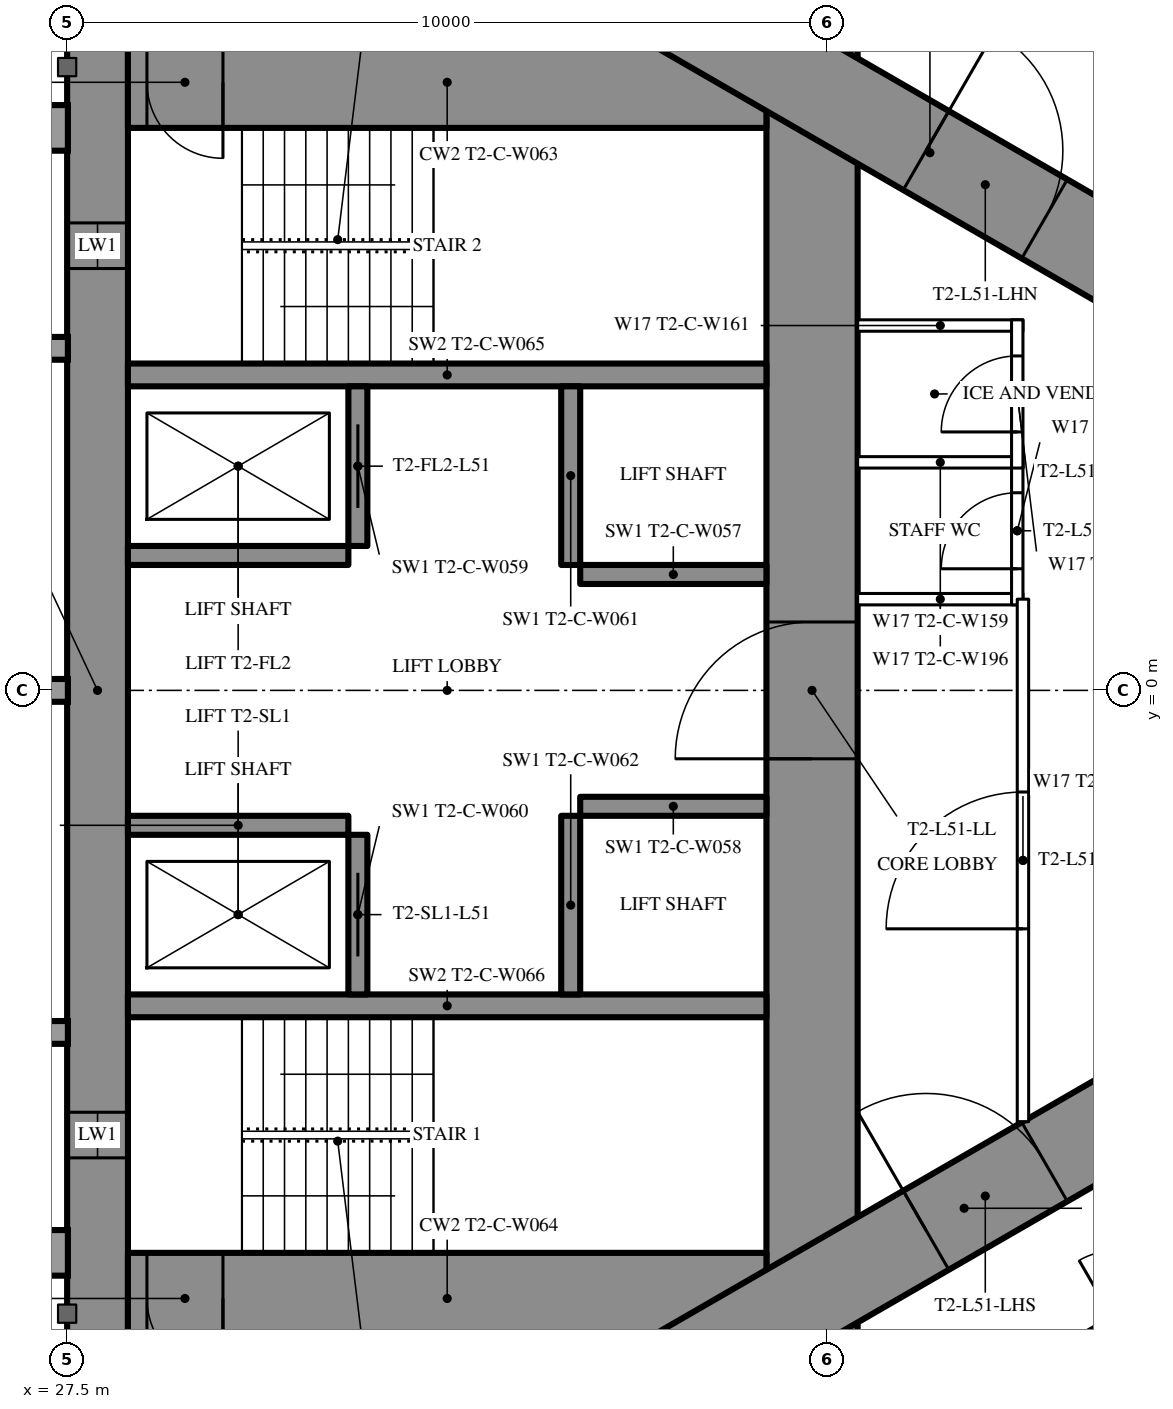
"""IFC4 building model, lengths in metres.
Left out: names, types, materials, properties, quantities, classifications, styles, units other than length and angle.
Written with IfcOpenShell. Run it as: python <this file> out.ifc"""

import sys

from ifc_helpers import new_model, si_unit, direction, frame, frame_2d, origin, place, context, subcontext, project, spatial, rectangle, extrude, element, fill, save


model = new_model("IFC4")
c1 = context("Model", 3, precision=1e-05, world=origin(), true_north=direction((0.0, 1.0)))
c2 = subcontext(c1, "Body", "Model", "MODEL_VIEW")
j1 = project(units=[si_unit("LENGTHUNIT", "METRE"), si_unit("PLANEANGLEUNIT", "RADIAN")], contexts=[c1])
p1 = place(None, origin())
s1 = spatial("IfcSite", under=j1, at=p1, CompositionType="ELEMENT")
p2 = place(p1, origin())
s2 = spatial("IfcBuilding", under=s1, at=p2, CompositionType="ELEMENT")
p3 = place(p2, frame((0.0, 0.0, 191.3)))
s3 = spatial("IfcBuildingStorey", under=s2, at=p3, CompositionType="ELEMENT", Elevation=191.3)
p4 = place(p3, frame((27.9, -8.6, 0.0), z_axis=(0.0, 0.0, 1.0), x_axis=(0.0, 1.0, 0.0)))
e1 = element("IfcWall", 1, at=p4, inside=s3, PredefinedType="SHEAR", context=c2, shape_type="SweptSolid", body=[
    extrude(rectangle(XDim=17.2, YDim=0.8, at=frame_2d((8.6, 0.0))), origin(), (0.0, 0.0, 1.0), 3.5),
])
p5 = place(p4, frame((2.45, 0.0, 0.6)))
e2 = element("IfcOpeningElement", 2, at=p5, cuts=e1, PredefinedType="OPENING", context=c2, shape_type="SweptSolid", body=[
    extrude(rectangle(XDim=0.6, YDim=2.1, at=frame_2d((0.3, 1.05))), frame((0.0, 0.41, 0.0), z_axis=(0.0, -1.0, 0.0), x_axis=(1.0, 0.0, 0.0)), (0.0, 0.0, 1.0), 0.82),
])
p6 = place(p4, frame((14.15, 0.0, 0.6)))
e3 = element("IfcOpeningElement", 3, at=p6, cuts=e1, PredefinedType="OPENING", context=c2, shape_type="SweptSolid", body=[
    extrude(rectangle(XDim=0.6, YDim=2.1, at=frame_2d((0.3, 1.05))), frame((0.0, 0.41, 0.0), z_axis=(0.0, -1.0, 0.0), x_axis=(1.0, 0.0, 0.0)), (0.0, 0.0, 1.0), 0.82),
])
p7 = place(p3, frame((37.3, -8.6, 0.0), z_axis=(0.0, 0.0, 1.0), x_axis=(0.0, 1.0, 0.0)))
e4 = element("IfcWall", 4, at=p7, inside=s3, PredefinedType="SHEAR", context=c2, shape_type="SweptSolid", body=[
    extrude(rectangle(XDim=17.2, YDim=1.2, at=frame_2d((8.6, 0.0))), origin(), (0.0, 0.0, 1.0), 3.5),
])
p8 = place(p7, frame((7.7, 0.0, 0.0)))
e5 = element("IfcOpeningElement", 5, at=p8, cuts=e4, PredefinedType="OPENING", context=c2, shape_type="SweptSolid", body=[
    extrude(rectangle(XDim=1.8, YDim=2.2, at=frame_2d((0.9, 1.1))), frame((0.0, 0.61, 0.0), z_axis=(0.0, -1.0, 0.0), x_axis=(1.0, 0.0, 0.0)), (0.0, 0.0, 1.0), 1.22),
])
p9 = place(p3, frame((28.3, -8.0, 0.0), z_axis=(0.0, 0.0, 1.0), x_axis=(1.0, 0.0, 0.0)))
e6 = element("IfcWall", 6, at=p9, inside=s3, PredefinedType="SHEAR", context=c2, shape_type="SweptSolid", body=[
    extrude(rectangle(XDim=8.4, YDim=1.2, at=frame_2d((4.2, 0.0))), origin(), (0.0, 0.0, 1.0), 3.5),
])
p10 = place(p9, frame((0.25, 0.0, 0.0)))
e7 = element("IfcOpeningElement", 7, at=p10, cuts=e6, PredefinedType="OPENING", context=c2, shape_type="SweptSolid", body=[
    extrude(rectangle(XDim=1.0, YDim=2.2, at=frame_2d((0.5, 1.1))), frame((0.0, 0.61, 0.0), z_axis=(0.0, -1.0, 0.0), x_axis=(1.0, 0.0, 0.0)), (0.0, 0.0, 1.0), 1.22),
])
p11 = place(p3, frame((28.3, 8.0, 0.0), z_axis=(0.0, 0.0, 1.0), x_axis=(1.0, 0.0, 0.0)))
e8 = element("IfcWall", 8, at=p11, inside=s3, PredefinedType="SHEAR", context=c2, shape_type="SweptSolid", body=[
    extrude(rectangle(XDim=8.4, YDim=1.2, at=frame_2d((4.2, 0.0))), origin(), (0.0, 0.0, 1.0), 3.5),
])
p12 = place(p11, frame((0.25, 0.0, 0.0)))
e9 = element("IfcOpeningElement", 9, at=p12, cuts=e8, PredefinedType="OPENING", context=c2, shape_type="SweptSolid", body=[
    extrude(rectangle(XDim=1.0, YDim=2.2, at=frame_2d((0.5, 1.1))), frame((0.0, 0.61, 0.0), z_axis=(0.0, -1.0, 0.0), x_axis=(1.0, 0.0, 0.0)), (0.0, 0.0, 1.0), 1.22),
])
for number, where, z_axis, x_axis in (
    (10, (28.3, -4.15, 0.0), (0.0, 0.0, 1.0), (1.0, 0.0, 0.0)),
    (11, (28.3, 4.15, 0.0), (0.0, 0.0, 1.0), (1.0, 0.0, 0.0)),
):
    element("IfcWall", number, at=place(p3, frame(where, z_axis=z_axis, x_axis=x_axis)), inside=s3, PredefinedType="SHEAR", context=c2, shape_type="SweptSolid", body=[
        extrude(rectangle(XDim=8.4, YDim=0.3, at=frame_2d((4.2, 0.0))), origin(), (0.0, 0.0, 1.0), 3.5),
    ])
p13 = place(p3, frame((31.325, -4.0, 0.0), z_axis=(0.0, 0.0, 1.0), x_axis=(0.0, 1.0, 0.0)))
e12 = element("IfcWall", 12, at=p13, inside=s3, PredefinedType="SHEAR", context=c2, shape_type="SweptSolid", body=[
    extrude(rectangle(XDim=2.1, YDim=0.25, at=frame_2d((1.05, 0.0))), origin(), (0.0, 0.0, 1.0), 3.5),
])
p14 = place(p13, frame((0.5, 0.0, 0.0)))
e13 = element("IfcOpeningElement", 13, at=p14, cuts=e12, PredefinedType="OPENING", context=c2, shape_type="SweptSolid", body=[
    extrude(rectangle(XDim=1.1, YDim=2.2, at=frame_2d((0.55, 1.1))), frame((0.0, 0.135, 0.0), z_axis=(0.0, -1.0, 0.0), x_axis=(1.0, 0.0, 0.0)), (0.0, 0.0, 1.0), 0.27),
])
p15 = place(p3, frame((34.125, -4.0, 0.0), z_axis=(0.0, 0.0, 1.0), x_axis=(0.0, 1.0, 0.0)))
e14 = element("IfcWall", 14, at=p15, inside=s3, PredefinedType="SHEAR", context=c2, shape_type="SweptSolid", body=[
    extrude(rectangle(XDim=2.35, YDim=0.25, at=frame_2d((1.175, 0.0))), origin(), (0.0, 0.0, 1.0), 3.5),
])
p16 = place(p3, frame((28.3, -1.775, 0.0), z_axis=(0.0, 0.0, 1.0), x_axis=(1.0, 0.0, 0.0)))
e15 = element("IfcWall", 15, at=p16, inside=s3, PredefinedType="SHEAR", context=c2, shape_type="SweptSolid", body=[
    extrude(rectangle(XDim=2.9, YDim=0.25, at=frame_2d((1.45, 0.0))), origin(), (0.0, 0.0, 1.0), 3.5),
])
p17 = place(p3, frame((34.25, -1.525, 0.0), z_axis=(0.0, 0.0, 1.0), x_axis=(1.0, 0.0, 0.0)))
e16 = element("IfcWall", 16, at=p17, inside=s3, PredefinedType="SHEAR", context=c2, shape_type="SweptSolid", body=[
    extrude(rectangle(XDim=2.45, YDim=0.25, at=frame_2d((1.225, 0.0))), origin(), (0.0, 0.0, 1.0), 3.5),
])
p18 = place(p3, frame((31.325, 1.9, 0.0), z_axis=(0.0, 0.0, 1.0), x_axis=(0.0, 1.0, 0.0)))
e17 = element("IfcWall", 17, at=p18, inside=s3, PredefinedType="SHEAR", context=c2, shape_type="SweptSolid", body=[
    extrude(rectangle(XDim=2.1, YDim=0.25, at=frame_2d((1.05, 0.0))), origin(), (0.0, 0.0, 1.0), 3.5),
])
p19 = place(p18, frame((0.5, 0.0, 0.0)))
e18 = element("IfcOpeningElement", 18, at=p19, cuts=e17, PredefinedType="OPENING", context=c2, shape_type="SweptSolid", body=[
    extrude(rectangle(XDim=1.1, YDim=2.2, at=frame_2d((0.55, 1.1))), frame((0.0, 0.135, 0.0), z_axis=(0.0, -1.0, 0.0), x_axis=(1.0, 0.0, 0.0)), (0.0, 0.0, 1.0), 0.27),
])
p20 = place(p3, frame((34.125, 1.65, 0.0), z_axis=(0.0, 0.0, 1.0), x_axis=(0.0, 1.0, 0.0)))
e19 = element("IfcWall", 19, at=p20, inside=s3, PredefinedType="SHEAR", context=c2, shape_type="SweptSolid", body=[
    extrude(rectangle(XDim=2.35, YDim=0.25, at=frame_2d((1.175, 0.0))), origin(), (0.0, 0.0, 1.0), 3.5),
])
p21 = place(p3, frame((28.3, 1.775, 0.0), z_axis=(0.0, 0.0, 1.0), x_axis=(1.0, 0.0, 0.0)))
e20 = element("IfcWall", 20, at=p21, inside=s3, PredefinedType="SHEAR", context=c2, shape_type="SweptSolid", body=[
    extrude(rectangle(XDim=2.9, YDim=0.25, at=frame_2d((1.45, 0.0))), origin(), (0.0, 0.0, 1.0), 3.5),
])
p22 = place(p3, frame((34.25, 1.525, 0.0), z_axis=(0.0, 0.0, 1.0), x_axis=(1.0, 0.0, 0.0)))
e21 = element("IfcWall", 21, at=p22, inside=s3, PredefinedType="SHEAR", context=c2, shape_type="SweptSolid", body=[
    extrude(rectangle(XDim=2.45, YDim=0.25, at=frame_2d((1.225, 0.0))), origin(), (0.0, 0.0, 1.0), 3.5),
])
p23 = place(p3, frame((27.2, -13.8, 0.0), z_axis=(0.0, 0.0, 1.0), x_axis=(0.866027159892, 0.499996958321, 0.0)))
e22 = element("IfcWall", 22, at=p23, inside=s3, PredefinedType="SHEAR", context=c2, shape_type="SweptSolid", body=[
    extrude(rectangle(XDim=27.947, YDim=1.2, at=frame_2d((13.973, 0.0))), origin(), (0.0, 0.0, 1.0), 3.5),
])
p24 = place(p23, frame((4.6, 0.0, 0.0)))
e23 = element("IfcOpeningElement", 23, at=p24, cuts=e22, PredefinedType="OPENING", context=c2, shape_type="SweptSolid", body=[
    extrude(rectangle(XDim=1.0, YDim=2.2, at=frame_2d((0.5, 1.1))), frame((0.0, 0.61, 0.0), z_axis=(0.0, -1.0, 0.0), x_axis=(1.0, 0.0, 0.0)), (0.0, 0.0, 1.0), 1.22),
])
p25 = place(p23, frame((13.395, 0.0, 0.0)))
e24 = element("IfcOpeningElement", 24, at=p25, cuts=e22, PredefinedType="OPENING", context=c2, shape_type="SweptSolid", body=[
    extrude(rectangle(XDim=1.8, YDim=2.2, at=frame_2d((0.9, 1.1))), frame((0.0, 0.61, 0.0), z_axis=(0.0, -1.0, 0.0), x_axis=(1.0, 0.0, 0.0)), (0.0, 0.0, 1.0), 1.22),
])
p26 = place(p3, frame((27.2, 13.8, 0.0), z_axis=(0.0, 0.0, 1.0), x_axis=(0.866024515034, -0.500001539357, 0.0)))
e25 = element("IfcWall", 25, at=p26, inside=s3, PredefinedType="SHEAR", context=c2, shape_type="SweptSolid", body=[
    extrude(rectangle(XDim=26.907, YDim=1.2, at=frame_2d((13.454, 0.0))), origin(), (0.0, 0.0, 1.0), 3.5),
])
p27 = place(p26, frame((4.6, 0.0, 0.0)))
e26 = element("IfcOpeningElement", 26, at=p27, cuts=e25, PredefinedType="OPENING", context=c2, shape_type="SweptSolid", body=[
    extrude(rectangle(XDim=1.0, YDim=2.2, at=frame_2d((0.5, 1.1))), frame((0.0, 0.61, 0.0), z_axis=(0.0, -1.0, 0.0), x_axis=(1.0, 0.0, 0.0)), (0.0, 0.0, 1.0), 1.22),
])
p28 = place(p26, frame((13.395, 0.0, 0.0)))
e27 = element("IfcOpeningElement", 27, at=p28, cuts=e25, PredefinedType="OPENING", context=c2, shape_type="SweptSolid", body=[
    extrude(rectangle(XDim=1.8, YDim=2.2, at=frame_2d((0.9, 1.1))), frame((0.0, 0.61, 0.0), z_axis=(0.0, -1.0, 0.0), x_axis=(1.0, 0.0, 0.0)), (0.0, 0.0, 1.0), 1.22),
])
p29 = place(p3, frame((27.959, -16.017, 0.0), z_axis=(0.0, 0.0, 1.0), x_axis=(0.866024151371, 0.500002169237, 0.0)))
e28 = element("IfcWall", 28, at=p29, inside=s3, PredefinedType="PARTITIONING", context=c2, shape_type="SweptSolid", body=[
    extrude(rectangle(XDim=32.034, YDim=0.2, at=frame_2d((16.017, 0.0))), origin(), (0.0, 0.0, 1.0), 3.25),
])
p30 = place(p29, frame((0.6, 0.0, 0.0)))
e29 = element("IfcOpeningElement", 29, at=p30, cuts=e28, PredefinedType="OPENING", context=c2, shape_type="SweptSolid", body=[
    extrude(rectangle(XDim=0.95, YDim=2.2, at=frame_2d((0.475, 1.1))), frame((0.0, 0.11, 0.0), z_axis=(0.0, -1.0, 0.0), x_axis=(1.0, 0.0, 0.0)), (0.0, 0.0, 1.0), 0.22),
])
p31 = place(p29, frame((13.132, 0.0, 0.0)))
e30 = element("IfcOpeningElement", 30, at=p31, cuts=e28, PredefinedType="OPENING", context=c2, shape_type="SweptSolid", body=[
    extrude(rectangle(XDim=0.95, YDim=2.2, at=frame_2d((0.475, 1.1))), frame((0.0, 0.11, 0.0), z_axis=(0.0, -1.0, 0.0), x_axis=(1.0, 0.0, 0.0)), (0.0, 0.0, 1.0), 0.22),
])
p32 = place(p29, frame((15.391, 0.0, 0.0)))
e31 = element("IfcOpeningElement", 31, at=p32, cuts=e28, PredefinedType="OPENING", context=c2, shape_type="SweptSolid", body=[
    extrude(rectangle(XDim=0.95, YDim=2.2, at=frame_2d((0.475, 1.1))), frame((0.0, 0.11, 0.0), z_axis=(0.0, -1.0, 0.0), x_axis=(1.0, 0.0, 0.0)), (0.0, 0.0, 1.0), 0.22),
])
p33 = place(p29, frame((19.441, 0.0, 0.0)))
e32 = element("IfcOpeningElement", 32, at=p33, cuts=e28, PredefinedType="OPENING", context=c2, shape_type="SweptSolid", body=[
    extrude(rectangle(XDim=0.95, YDim=2.2, at=frame_2d((0.475, 1.1))), frame((0.0, 0.11, 0.0), z_axis=(0.0, -1.0, 0.0), x_axis=(1.0, 0.0, 0.0)), (0.0, 0.0, 1.0), 0.22),
])
p34 = place(p29, frame((26.406, 0.0, 0.0)))
e33 = element("IfcOpeningElement", 33, at=p34, cuts=e28, PredefinedType="OPENING", context=c2, shape_type="SweptSolid", body=[
    extrude(rectangle(XDim=0.95, YDim=2.2, at=frame_2d((0.475, 1.1))), frame((0.0, 0.11, 0.0), z_axis=(0.0, -1.0, 0.0), x_axis=(1.0, 0.0, 0.0)), (0.0, 0.0, 1.0), 0.22),
])
p35 = place(p29, frame((28.87, 0.0, 0.0)))
e34 = element("IfcOpeningElement", 34, at=p35, cuts=e28, PredefinedType="OPENING", context=c2, shape_type="SweptSolid", body=[
    extrude(rectangle(XDim=1.8, YDim=2.2, at=frame_2d((0.9, 1.1))), frame((0.0, 0.11, 0.0), z_axis=(0.0, -1.0, 0.0), x_axis=(1.0, 0.0, 0.0)), (0.0, 0.0, 1.0), 0.22),
])
for number, where, z_axis, x_axis in (
    (35, (37.9, 1.2, 0.0), (0.0, 0.0, 1.0), (1.0, 0.0, 0.0)),
    (36, (37.9, 3.0, 0.0), (0.0, 0.0, 1.0), (1.0, 0.0, 0.0)),
    (37, (37.9, 4.8, 0.0), (0.0, 0.0, 1.0), (1.0, 0.0, 0.0)),
):
    element("IfcWall", number, at=place(p3, frame(where, z_axis=z_axis, x_axis=x_axis)), inside=s3, PredefinedType="PARTITIONING", context=c2, shape_type="SweptSolid", body=[
        extrude(rectangle(XDim=2.175, YDim=0.15, at=frame_2d((1.087, 0.0))), origin(), (0.0, 0.0, 1.0), 3.25),
    ])
p36 = place(p3, frame((40.0, 1.125, 0.0), z_axis=(0.0, 0.0, 1.0), x_axis=(0.0, 1.0, 0.0)))
e38 = element("IfcWall", 38, at=p36, inside=s3, PredefinedType="PARTITIONING", context=c2, shape_type="SweptSolid", body=[
    extrude(rectangle(XDim=1.95, YDim=0.15, at=frame_2d((0.975, 0.0))), origin(), (0.0, 0.0, 1.0), 3.25),
])
p37 = place(p36, frame((0.475, 0.0, 0.0)))
e39 = element("IfcOpeningElement", 39, at=p37, cuts=e38, PredefinedType="OPENING", context=c2, shape_type="SweptSolid", body=[
    extrude(rectangle(XDim=1.0, YDim=2.2, at=frame_2d((0.5, 1.1))), frame((0.0, 0.085, 0.0), z_axis=(0.0, -1.0, 0.0), x_axis=(1.0, 0.0, 0.0)), (0.0, 0.0, 1.0), 0.17),
])
p38 = place(p3, frame((40.0, 2.925, 0.0), z_axis=(0.0, 0.0, 1.0), x_axis=(0.0, 1.0, 0.0)))
e40 = element("IfcWall", 40, at=p38, inside=s3, PredefinedType="PARTITIONING", context=c2, shape_type="SweptSolid", body=[
    extrude(rectangle(XDim=1.95, YDim=0.15, at=frame_2d((0.975, 0.0))), origin(), (0.0, 0.0, 1.0), 3.25),
])
p39 = place(p38, frame((0.475, 0.0, 0.0)))
e41 = element("IfcOpeningElement", 41, at=p39, cuts=e40, PredefinedType="OPENING", context=c2, shape_type="SweptSolid", body=[
    extrude(rectangle(XDim=1.0, YDim=2.2, at=frame_2d((0.5, 1.1))), frame((0.0, 0.085, 0.0), z_axis=(0.0, -1.0, 0.0), x_axis=(1.0, 0.0, 0.0)), (0.0, 0.0, 1.0), 0.17),
])
p40 = place(p3, frame((40.075, -5.674, 0.0), z_axis=(0.0, 0.0, 1.0), x_axis=(0.0, 1.0, 0.0)))
e42 = element("IfcWall", 42, at=p40, inside=s3, PredefinedType="PARTITIONING", context=c2, shape_type="SweptSolid", body=[
    extrude(rectangle(XDim=6.874, YDim=0.15, at=frame_2d((3.437, 0.0))), origin(), (0.0, 0.0, 1.0), 3.25),
])
p41 = place(p40, frame((2.537, 0.0, 0.0)))
e43 = element("IfcOpeningElement", 43, at=p41, cuts=e42, PredefinedType="OPENING", context=c2, shape_type="SweptSolid", body=[
    extrude(rectangle(XDim=1.8, YDim=2.2, at=frame_2d((0.9, 1.1))), frame((0.0, 0.085, 0.0), z_axis=(0.0, -1.0, 0.0), x_axis=(1.0, 0.0, 0.0)), (0.0, 0.0, 1.0), 0.17),
])
p42 = place(p37, origin())
e44 = element("IfcDoor", 44, at=p42, inside=s3, OperationType="SINGLE_SWING_LEFT", PredefinedType="DOOR", context=c2, shape_type="SweptSolid", body=[
    extrude(rectangle(XDim=1.0, YDim=2.2, at=frame_2d((0.5, 1.1))), frame((0.0, 0.025, 0.0), z_axis=(0.0, -1.0, 0.0), x_axis=(1.0, 0.0, 0.0)), (0.0, 0.0, 1.0), 0.05),
])
fill(e39, e44)
p43 = place(p39, origin())
e45 = element("IfcDoor", 45, at=p43, inside=s3, OperationType="SINGLE_SWING_LEFT", PredefinedType="DOOR", context=c2, shape_type="SweptSolid", body=[
    extrude(rectangle(XDim=1.0, YDim=2.2, at=frame_2d((0.5, 1.1))), frame((0.0, 0.025, 0.0), z_axis=(0.0, -1.0, 0.0), x_axis=(1.0, 0.0, 0.0)), (0.0, 0.0, 1.0), 0.05),
])
fill(e41, e45)
p44 = place(p41, origin())
e46 = element("IfcDoor", 46, at=p44, inside=s3, OperationType="DOUBLE_DOOR_SINGLE_SWING", PredefinedType="DOOR", context=c2, shape_type="SweptSolid", body=[
    extrude(rectangle(XDim=1.8, YDim=2.2, at=frame_2d((0.9, 1.1))), frame((0.0, 0.025, 0.0), z_axis=(0.0, -1.0, 0.0), x_axis=(1.0, 0.0, 0.0)), (0.0, 0.0, 1.0), 0.05),
])
fill(e43, e46)
p45 = place(p25, origin())
e47 = element("IfcDoor", 47, at=p45, inside=s3, OperationType="DOUBLE_DOOR_SINGLE_SWING", PredefinedType="DOOR", context=c2, shape_type="SweptSolid", body=[
    extrude(rectangle(XDim=1.8, YDim=2.2, at=frame_2d((0.9, 1.1))), frame((0.0, 0.025, 0.0), z_axis=(0.0, -1.0, 0.0), x_axis=(1.0, 0.0, 0.0)), (0.0, 0.0, 1.0), 0.05),
])
fill(e24, e47)
p46 = place(p28, origin())
e48 = element("IfcDoor", 48, at=p46, inside=s3, OperationType="DOUBLE_DOOR_SINGLE_SWING", PredefinedType="DOOR", context=c2, shape_type="SweptSolid", body=[
    extrude(rectangle(XDim=1.8, YDim=2.2, at=frame_2d((0.9, 1.1))), frame((0.0, 0.025, 0.0), z_axis=(0.0, -1.0, 0.0), x_axis=(1.0, 0.0, 0.0)), (0.0, 0.0, 1.0), 0.05),
])
fill(e27, e48)
p47 = place(p8, origin())
e49 = element("IfcDoor", 49, at=p47, inside=s3, OperationType="DOUBLE_DOOR_SINGLE_SWING", PredefinedType="DOOR", context=c2, shape_type="SweptSolid", body=[
    extrude(rectangle(XDim=1.8, YDim=2.2, at=frame_2d((0.9, 1.1))), frame((0.0, 0.025, 0.0), z_axis=(0.0, -1.0, 0.0), x_axis=(1.0, 0.0, 0.0)), (0.0, 0.0, 1.0), 0.05),
])
fill(e5, e49)
p48 = place(p10, origin())
e50 = element("IfcDoor", 50, at=p48, inside=s3, OperationType="SINGLE_SWING_RIGHT", PredefinedType="DOOR", context=c2, shape_type="SweptSolid", body=[
    extrude(rectangle(XDim=1.0, YDim=2.2, at=frame_2d((0.5, 1.1))), frame((0.0, 0.025, 0.0), z_axis=(0.0, -1.0, 0.0), x_axis=(1.0, 0.0, 0.0)), (0.0, 0.0, 1.0), 0.05),
])
fill(e7, e50)
p49 = place(p12, origin())
e51 = element("IfcDoor", 51, at=p49, inside=s3, OperationType="SINGLE_SWING_RIGHT", PredefinedType="DOOR", context=c2, shape_type="SweptSolid", body=[
    extrude(rectangle(XDim=1.0, YDim=2.2, at=frame_2d((0.5, 1.1))), frame((0.0, 0.025, 0.0), z_axis=(0.0, -1.0, 0.0), x_axis=(1.0, 0.0, 0.0)), (0.0, 0.0, 1.0), 0.05),
])
fill(e9, e51)
p50 = place(p14, origin())
e52 = element("IfcDoor", 52, at=p50, inside=s3, OperationType="SLIDING_TO_LEFT", PredefinedType="USERDEFINED", context=c2, shape_type="SweptSolid", body=[
    extrude(rectangle(XDim=1.1, YDim=2.2, at=frame_2d((0.55, 1.1))), frame((0.0, 0.025, 0.0), z_axis=(0.0, -1.0, 0.0), x_axis=(1.0, 0.0, 0.0)), (0.0, 0.0, 1.0), 0.05),
])
fill(e13, e52)
p51 = place(p19, origin())
e53 = element("IfcDoor", 53, at=p51, inside=s3, OperationType="SLIDING_TO_LEFT", PredefinedType="USERDEFINED", context=c2, shape_type="SweptSolid", body=[
    extrude(rectangle(XDim=1.1, YDim=2.2, at=frame_2d((0.55, 1.1))), frame((0.0, 0.025, 0.0), z_axis=(0.0, -1.0, 0.0), x_axis=(1.0, 0.0, 0.0)), (0.0, 0.0, 1.0), 0.05),
])
fill(e18, e53)
p52 = place(p5, origin())
e54 = element("IfcWindow", 54, at=p52, inside=s3, PartitioningType="SINGLE_PANEL", PredefinedType="WINDOW", context=c2, shape_type="SweptSolid", body=[
    extrude(rectangle(XDim=0.6, YDim=2.1, at=frame_2d((0.3, 1.05))), frame((0.0, 0.03, 0.0), z_axis=(0.0, -1.0, 0.0), x_axis=(1.0, 0.0, 0.0)), (0.0, 0.0, 1.0), 0.06),
])
fill(e2, e54)
p53 = place(p6, origin())
e55 = element("IfcWindow", 55, at=p53, inside=s3, PartitioningType="SINGLE_PANEL", PredefinedType="WINDOW", context=c2, shape_type="SweptSolid", body=[
    extrude(rectangle(XDim=0.6, YDim=2.1, at=frame_2d((0.3, 1.05))), frame((0.0, 0.03, 0.0), z_axis=(0.0, -1.0, 0.0), x_axis=(1.0, 0.0, 0.0)), (0.0, 0.0, 1.0), 0.06),
])
fill(e3, e55)
save(model, sys.argv[1])
